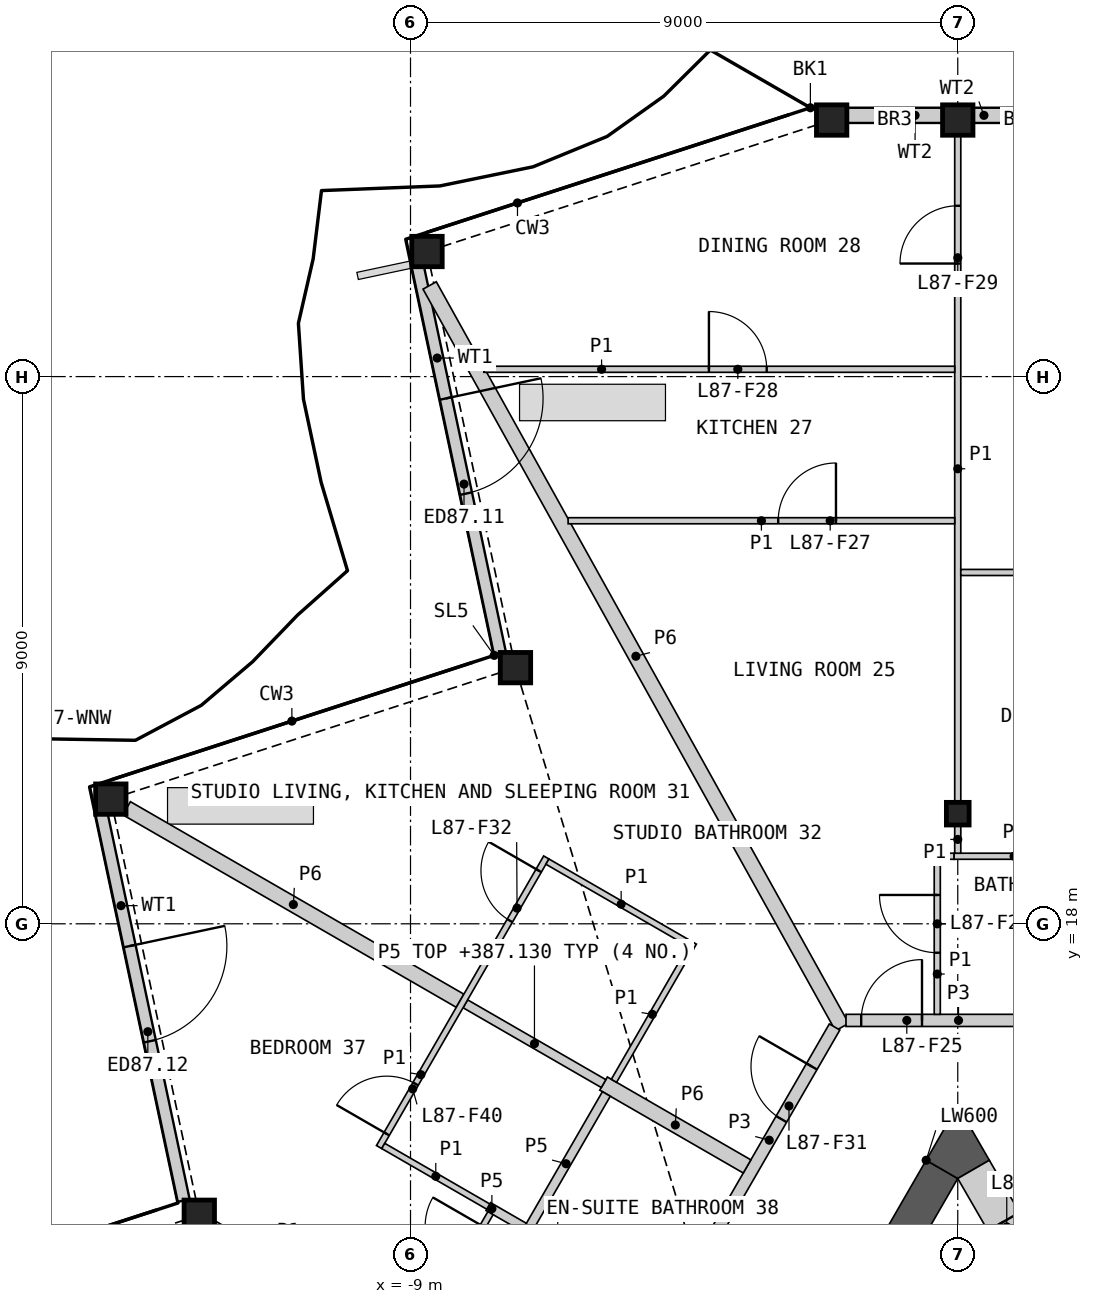
"""IFC4 building model, lengths in metres.
Left out: names, types, materials, properties, quantities, classifications, styles, units other than length and angle.
Written with IfcOpenShell. Run it as: python <this file> out.ifc"""

import sys

from ifc_helpers import new_model, si_unit, direction, frame, frame_2d, origin, origin_2d, place, context, subcontext, project, spatial, polyline, rectangle, hollow_rectangle, i_section, outline, extrude, element, fill, save


model = new_model("IFC4")
c1 = context("Model", 3, precision=1e-05, world=origin(), true_north=direction((0.0, 1.0)))
c2 = subcontext(c1, "Body", "Model", "MODEL_VIEW")
j1 = project(units=[si_unit("LENGTHUNIT", "METRE"), si_unit("PLANEANGLEUNIT", "RADIAN")], contexts=[c1])
p1 = place(None, origin())
s1 = spatial("IfcSite", under=j1, at=p1, CompositionType="ELEMENT")
p2 = place(p1, origin())
s2 = spatial("IfcBuilding", under=s1, at=p2, CompositionType="ELEMENT")
p3 = place(p2, frame((0.0, 0.0, 384.8)))
s3 = spatial("IfcBuildingStorey", under=s2, at=p3, CompositionType="ELEMENT", Elevation=384.8)
for number, where, z_axis, x_axis in (
    (1, (0.0, 31.219, 0.0), (0.0, 0.0, 1.0), (1.0, 0.0, 0.0)),
    (2, (-2.074, 31.219, 0.0), (0.0, 0.0, 1.0), (1.0, 0.0, 0.0)),
    (3, (-8.729, 29.057, 0.0), (0.0, 0.0, 1.0), (1.0, 0.0, 0.0)),
    (4, (-7.274, 22.213, 0.0), (0.0, 0.0, 1.0), (1.0, 0.0, 0.0)),
    (5, (-13.929, 20.051, 0.0), (0.0, 0.0, 1.0), (1.0, 0.0, 0.0)),
    (6, (-12.474, 13.206, 0.0), (0.0, 0.0, 1.0), (1.0, 0.0, 0.0)),
):
    element("IfcColumn", number, at=place(p3, frame(where, z_axis=z_axis, x_axis=x_axis)), inside=s3, PredefinedType="COLUMN", context=c2, shape_type="SweptSolid", body=[
        extrude(hollow_rectangle(XDim=0.5, YDim=0.5, WallThickness=0.03, at=origin_2d()), origin(), (0.0, 0.0, 1.0), 3.4),
    ])
p4 = place(p3, frame((0.0, 19.811, 0.0), z_axis=(0.0, 0.0, 1.0), x_axis=(1.0, 0.0, 0.0)))
e7 = element("IfcColumn", 7, at=p4, inside=s3, PredefinedType="COLUMN", context=c2, shape_type="SweptSolid", body=[
    extrude(i_section(OverallWidth=0.374, OverallDepth=0.372, WebThickness=0.016, FlangeThickness=0.026, at=origin_2d()), origin(), (0.0, 0.0, 1.0), 3.4),
])
p5 = place(p3, frame((2.058, 31.296, 0.0), z_axis=(0.0, 0.0, 1.0), x_axis=(-1.0, 0.0, 0.0)))
e8 = element("IfcWall", 8, at=p5, inside=s3, PredefinedType="SOLIDWALL", context=c2, shape_type="SweptSolid", body=[
    extrude(rectangle(XDim=1.808, YDim=0.25, at=frame_2d((0.904, 0.0))), origin(), (0.0, 0.0, 1.0), 2.634),
])
p6 = place(p5, frame((0.35, 0.0, 1.8)))
e9 = element("IfcOpeningElement", 9, at=p6, cuts=e8, PredefinedType="OPENING", context=c2, shape_type="SweptSolid", body=[
    extrude(rectangle(XDim=0.9, YDim=0.6, at=frame_2d((0.45, 0.3))), frame((0.0, 0.135, 0.0), z_axis=(0.0, -1.0, 0.0), x_axis=(1.0, 0.0, 0.0)), (0.0, 0.0, 1.0), 0.27),
])
p7 = place(p3, frame((-0.25, 31.296, 0.0), z_axis=(0.0, 0.0, 1.0), x_axis=(-1.0, 0.0, 0.0)))
e10 = element("IfcWall", 10, at=p7, inside=s3, PredefinedType="SOLIDWALL", context=c2, shape_type="SweptSolid", body=[
    extrude(rectangle(XDim=1.808, YDim=0.25, at=frame_2d((0.904, 0.0))), origin(), (0.0, 0.0, 1.0), 2.634),
])
p8 = place(p3, frame((-8.905, 28.922, 0.0), z_axis=(0.0, 0.0, 1.0), x_axis=(0.207917488951, -0.978146368285, 0.0)))
e11 = element("IfcWall", 11, at=p8, inside=s3, PredefinedType="SOLIDWALL", context=c2, shape_type="SweptSolid", body=[
    extrude(rectangle(XDim=6.612, YDim=0.2, at=frame_2d((3.306, 0.0))), origin(), (0.0, 0.0, 1.0), 2.634),
])
p9 = place(p8, frame((2.333, 0.0, 0.0)))
e12 = element("IfcOpeningElement", 12, at=p9, cuts=e11, PredefinedType="OPENING", context=c2, shape_type="SweptSolid", body=[
    extrude(rectangle(XDim=1.6, YDim=2.25, at=frame_2d((0.8, 1.125))), frame((0.0, 0.11, 0.0), z_axis=(0.0, -1.0, 0.0), x_axis=(1.0, 0.0, 0.0)), (0.0, 0.0, 1.0), 0.22),
])
p10 = place(p3, frame((-14.104, 19.915, 0.0), z_axis=(0.0, 0.0, 1.0), x_axis=(0.207924998532, -0.978144771997, 0.0)))
e13 = element("IfcWall", 13, at=p10, inside=s3, PredefinedType="SOLIDWALL", context=c2, shape_type="SweptSolid", body=[
    extrude(rectangle(XDim=6.612, YDim=0.2, at=frame_2d((3.306, 0.0))), origin(), (0.0, 0.0, 1.0), 2.634),
])
p11 = place(p10, frame((2.333, 0.0, 0.0)))
e14 = element("IfcOpeningElement", 14, at=p11, cuts=e13, PredefinedType="OPENING", context=c2, shape_type="SweptSolid", body=[
    extrude(rectangle(XDim=1.6, YDim=2.25, at=frame_2d((0.8, 1.125))), frame((0.0, 0.11, 0.0), z_axis=(0.0, -1.0, 0.0), x_axis=(1.0, 0.0, 0.0)), (0.0, 0.0, 1.0), 0.22),
])
p12 = place(p3, frame((-0.26, 13.961, 0.0), z_axis=(0.0, 0.0, 1.0), x_axis=(-0.499980485389, -0.866036670257, 0.0)))
e15 = element("IfcWall", 15, at=p12, inside=s3, PredefinedType="SHEAR", context=c2, shape_type="SweptSolid", body=[
    extrude(rectangle(XDim=4.559, YDim=0.6, at=frame_2d((2.28, 0.0))), origin(), (0.0, 0.0, 1.0), 3.1),
])
p13 = place(p3, origin())
e16 = element("IfcWall", 16, at=p13, inside=s3, PredefinedType="SHEAR", context=c2, shape_type="SweptSolid", body=[
    extrude(outline(polyline([(-0.52, 14.111), (0.0, 15.011), (0.52, 14.111), (0.0, 13.811), (-0.52, 14.111)])), origin(), (0.0, 0.0, 1.0), 3.1),
])
p14 = place(p3, frame((1.556, 11.716, 0.0), z_axis=(0.0, 0.0, 1.0), x_axis=(-0.500018667571, 0.866014625789, 0.0)))
e17 = element("IfcWall", 17, at=p14, inside=s3, PredefinedType="SHEAR", context=c2, shape_type="SweptSolid", body=[
    extrude(rectangle(XDim=2.592, YDim=0.6, at=frame_2d((1.296, 0.0))), origin(), (0.0, 0.0, 1.0), 3.1),
])
p15 = place(p14, frame((0.6, 0.0, 0.0)))
e18 = element("IfcOpeningElement", 18, at=p15, cuts=e17, PredefinedType="OPENING", context=c2, shape_type="SweptSolid", body=[
    extrude(rectangle(XDim=1.0, YDim=2.1, at=frame_2d((0.5, 1.05))), frame((0.0, 0.31, 0.0), z_axis=(0.0, -1.0, 0.0), x_axis=(1.0, 0.0, 0.0)), (0.0, 0.0, 1.0), 0.62),
])
p16 = place(p3, frame((-8.685, 28.499, 0.0), z_axis=(0.0, 0.0, 1.0), x_axis=(0.486017177904, -0.873949256412, 0.0)))
e19 = element("IfcWall", 19, at=p16, inside=s3, PredefinedType="PARTITIONING", context=c2, shape_type="SweptSolid", body=[
    extrude(rectangle(XDim=13.956, YDim=0.25, at=frame_2d((6.978, 0.0))), origin(), (0.0, 0.0, 1.0), 2.33),
])
p17 = place(p3, frame((-13.669, 19.9, 0.0), z_axis=(0.0, 0.0, 1.0), x_axis=(0.866032778651, -0.499987226139, 0.0)))
e20 = element("IfcWall", 20, at=p17, inside=s3, PredefinedType="PARTITIONING", context=c2, shape_type="SweptSolid", body=[
    extrude(rectangle(XDim=6.332, YDim=0.25, at=frame_2d((3.166, 0.0))), origin(), (0.0, 0.0, 1.0), 2.33),
])
p18 = place(p3, frame((-4.176, 12.579, 0.0), z_axis=(0.0, 0.0, 1.0), x_axis=(0.500004215162, 0.866022970146, 0.0)))
e21 = element("IfcWall", 21, at=p18, inside=s3, PredefinedType="PARTITIONING", context=c2, shape_type="SweptSolid", body=[
    extrude(rectangle(XDim=4.3, YDim=0.2, at=frame_2d((2.15, 0.0))), origin(), (0.0, 0.0, 1.0), 3.1),
])
p19 = place(p18, frame((2.55, 0.0, 0.0)))
e22 = element("IfcOpeningElement", 22, at=p19, cuts=e21, PredefinedType="OPENING", context=c2, shape_type="SweptSolid", body=[
    extrude(rectangle(XDim=1.0, YDim=2.1, at=frame_2d((0.5, 1.05))), frame((0.0, 0.11, 0.0), z_axis=(0.0, -1.0, 0.0), x_axis=(1.0, 0.0, 0.0)), (0.0, 0.0, 1.0), 0.22),
])
p20 = place(p3, frame((-1.838, 16.411, 0.0), z_axis=(0.0, 0.0, 1.0), x_axis=(1.0, 0.0, 0.0)))
e23 = element("IfcWall", 23, at=p20, inside=s3, PredefinedType="PARTITIONING", context=c2, shape_type="SweptSolid", body=[
    extrude(rectangle(XDim=3.701, YDim=0.2, at=frame_2d((1.851, 0.0))), origin(), (0.0, 0.0, 1.0), 3.1),
])
p21 = place(p20, frame((0.25, 0.0, 0.0)))
e24 = element("IfcOpeningElement", 24, at=p21, cuts=e23, PredefinedType="OPENING", context=c2, shape_type="SweptSolid", body=[
    extrude(rectangle(XDim=1.0, YDim=2.1, at=frame_2d((0.5, 1.05))), frame((0.0, 0.11, 0.0), z_axis=(0.0, -1.0, 0.0), x_axis=(1.0, 0.0, 0.0)), (0.0, 0.0, 1.0), 0.22),
])
p22 = place(p3, frame((-5.825, 15.372, 0.0), z_axis=(0.0, 0.0, 1.0), x_axis=(0.866051307416, -0.49995513091, 0.0)))
e25 = element("IfcWall", 25, at=p22, inside=s3, PredefinedType="PARTITIONING", context=c2, shape_type="SweptSolid", body=[
    extrude(rectangle(XDim=2.725, YDim=0.25, at=frame_2d((1.362, 0.0))), origin(), (0.0, 0.0, 1.0), 2.33),
])
p23 = place(p3, frame((-8.098, 16.684, 0.0), z_axis=(0.0, 0.0, 1.0), x_axis=(0.866036909293, -0.499980071345, 0.0)))
e26 = element("IfcWall", 26, at=p23, inside=s3, PredefinedType="PLUMBINGWALL", context=c2, shape_type="SweptSolid", body=[
    extrude(rectangle(XDim=2.625, YDim=0.15, at=frame_2d((1.312, 0.0))), origin(), (0.0, 0.0, 1.0), 2.33),
])
p24 = place(p3, frame((-7.104, 12.906, 0.0), z_axis=(0.0, 0.0, 1.0), x_axis=(0.499993606316, 0.866029095148, 0.0)))
e27 = element("IfcWall", 27, at=p24, inside=s3, PredefinedType="PLUMBINGWALL", context=c2, shape_type="SweptSolid", body=[
    extrude(rectangle(XDim=2.65, YDim=0.15, at=frame_2d((1.325, 0.0))), origin(), (0.0, 0.0, 1.0), 2.33),
])
p25 = place(p3, frame((-7.72, 13.349, 0.0), z_axis=(0.0, 0.0, 1.0), x_axis=(0.866113839764, -0.499846793097, 0.0)))
e28 = element("IfcWall", 28, at=p25, inside=s3, PredefinedType="PLUMBINGWALL", context=c2, shape_type="SweptSolid", body=[
    extrude(rectangle(XDim=0.68, YDim=0.15, at=frame_2d((0.34, 0.0))), origin(), (0.0, 0.0, 1.0), 2.33),
])
p26 = place(p3, frame((0.0, 20.008, 0.0), z_axis=(0.0, 0.0, 1.0), x_axis=(0.0, 1.0, 0.0)))
e29 = element("IfcWall", 29, at=p26, inside=s3, PredefinedType="PARTITIONING", context=c2, shape_type="SweptSolid", body=[
    extrude(rectangle(XDim=10.951, YDim=0.1, at=frame_2d((5.476, 0.0))), origin(), (0.0, 0.0, 1.0), 2.33),
])
p27 = place(p26, frame((8.851, 0.0, 0.0)))
e30 = element("IfcOpeningElement", 30, at=p27, cuts=e29, PredefinedType="OPENING", context=c2, shape_type="SweptSolid", body=[
    extrude(rectangle(XDim=0.95, YDim=2.1, at=frame_2d((0.475, 1.05))), frame((0.0, 0.06, 0.0), z_axis=(0.0, -1.0, 0.0), x_axis=(1.0, 0.0, 0.0)), (0.0, 0.0, 1.0), 0.12),
])
p28 = place(p3, frame((-7.793, 27.12, 0.0), z_axis=(0.0, 0.0, 1.0), x_axis=(1.0, 0.0, 0.0)))
e31 = element("IfcWall", 31, at=p28, inside=s3, PredefinedType="PARTITIONING", context=c2, shape_type="SweptSolid", body=[
    extrude(rectangle(XDim=7.743, YDim=0.1, at=frame_2d((3.872, 0.0))), origin(), (0.0, 0.0, 1.0), 2.33),
])
p29 = place(p28, frame((3.701, 0.0, 0.0)))
e32 = element("IfcOpeningElement", 32, at=p29, cuts=e31, PredefinedType="OPENING", context=c2, shape_type="SweptSolid", body=[
    extrude(rectangle(XDim=0.95, YDim=2.1, at=frame_2d((0.475, 1.05))), frame((0.0, 0.06, 0.0), z_axis=(0.0, -1.0, 0.0), x_axis=(1.0, 0.0, 0.0)), (0.0, 0.0, 1.0), 0.12),
])
p30 = place(p3, frame((-6.408, 24.629, 0.0), z_axis=(0.0, 0.0, 1.0), x_axis=(1.0, 0.0, 0.0)))
e33 = element("IfcWall", 33, at=p30, inside=s3, PredefinedType="PARTITIONING", context=c2, shape_type="SweptSolid", body=[
    extrude(rectangle(XDim=6.358, YDim=0.1, at=frame_2d((3.179, 0.0))), origin(), (0.0, 0.0, 1.0), 2.33),
])
p31 = place(p30, frame((3.455, 0.0, 0.0)))
e34 = element("IfcOpeningElement", 34, at=p31, cuts=e33, PredefinedType="OPENING", context=c2, shape_type="SweptSolid", body=[
    extrude(rectangle(XDim=0.95, YDim=2.1, at=frame_2d((0.475, 1.05))), frame((0.0, 0.06, 0.0), z_axis=(0.0, -1.0, 0.0), x_axis=(1.0, 0.0, 0.0)), (0.0, 0.0, 1.0), 0.12),
])
p32 = place(p3, frame((0.05, 23.778, 0.0), z_axis=(0.0, 0.0, 1.0), x_axis=(1.0, 0.0, 0.0)))
e35 = element("IfcWall", 35, at=p32, inside=s3, PredefinedType="PARTITIONING", context=c2, shape_type="SweptSolid", body=[
    extrude(rectangle(XDim=5.91, YDim=0.1, at=frame_2d((2.955, 0.0))), origin(), (0.0, 0.0, 1.0), 2.33),
])
p33 = place(p32, frame((3.291, 0.0, 0.0)))
e36 = element("IfcOpeningElement", 36, at=p33, cuts=e35, PredefinedType="OPENING", context=c2, shape_type="SweptSolid", body=[
    extrude(rectangle(XDim=0.95, YDim=2.1, at=frame_2d((0.475, 1.05))), frame((0.0, 0.06, 0.0), z_axis=(0.0, -1.0, 0.0), x_axis=(1.0, 0.0, 0.0)), (0.0, 0.0, 1.0), 0.12),
])
p34 = place(p3, frame((-9.517, 14.328, 0.0), z_axis=(0.0, 0.0, 1.0), x_axis=(0.499996545922, 0.866027397988, 0.0)))
e37 = element("IfcWall", 37, at=p34, inside=s3, PredefinedType="PARTITIONING", context=c2, shape_type="SweptSolid", body=[
    extrude(rectangle(XDim=5.5, YDim=0.1, at=frame_2d((2.75, 0.0))), origin(), (0.0, 0.0, 1.0), 2.33),
])
p35 = place(p34, frame((4.3, 0.0, 0.0)))
e38 = element("IfcOpeningElement", 38, at=p35, cuts=e37, PredefinedType="OPENING", context=c2, shape_type="SweptSolid", body=[
    extrude(rectangle(XDim=0.95, YDim=2.1, at=frame_2d((0.475, 1.05))), frame((0.0, 0.06, 0.0), z_axis=(0.0, -1.0, 0.0), x_axis=(1.0, 0.0, 0.0)), (0.0, 0.0, 1.0), 0.12),
])
p36 = place(p34, frame((0.25, 0.0, 0.0)))
e39 = element("IfcOpeningElement", 39, at=p36, cuts=e37, PredefinedType="OPENING", context=c2, shape_type="SweptSolid", body=[
    extrude(rectangle(XDim=0.95, YDim=2.1, at=frame_2d((0.475, 1.05))), frame((0.0, 0.06, 0.0), z_axis=(0.0, -1.0, 0.0), x_axis=(1.0, 0.0, 0.0)), (0.0, 0.0, 1.0), 0.12),
])
p37 = place(p3, frame((-12.214, 13.056, 0.0), z_axis=(0.0, 0.0, 1.0), x_axis=(0.866017452598, -0.500013771606, 0.0)))
e40 = element("IfcWall", 40, at=p37, inside=s3, PredefinedType="PARTITIONING", context=c2, shape_type="SweptSolid", body=[
    extrude(rectangle(XDim=4.425, YDim=0.1, at=frame_2d((2.213, 0.0))), origin(), (0.0, 0.0, 1.0), 2.33),
])
p38 = place(p37, frame((1.994, 0.0, 0.0)))
e41 = element("IfcOpeningElement", 41, at=p38, cuts=e40, PredefinedType="OPENING", context=c2, shape_type="SweptSolid", body=[
    extrude(rectangle(XDim=0.95, YDim=2.1, at=frame_2d((0.475, 1.05))), frame((0.0, 0.06, 0.0), z_axis=(0.0, -1.0, 0.0), x_axis=(1.0, 0.0, 0.0)), (0.0, 0.0, 1.0), 0.12),
])
p39 = place(p3, frame((-6.748, 19.023, 0.0), z_axis=(0.0, 0.0, 1.0), x_axis=(0.866034573852, -0.49998411664, 0.0)))
e42 = element("IfcWall", 42, at=p39, inside=s3, PredefinedType="PARTITIONING", context=c2, shape_type="SweptSolid", body=[
    extrude(rectangle(XDim=2.8, YDim=0.1, at=frame_2d((1.4, 0.0))), origin(), (0.0, 0.0, 1.0), 2.33),
])
p40 = place(p3, frame((-5.654, 15.418, 0.0), z_axis=(0.0, 0.0, 1.0), x_axis=(0.500048846702, 0.865997200291, 0.0)))
e43 = element("IfcWall", 43, at=p40, inside=s3, PredefinedType="PARTITIONING", context=c2, shape_type="SweptSolid", body=[
    extrude(rectangle(XDim=2.525, YDim=0.1, at=frame_2d((1.263, 0.0))), origin(), (0.0, 0.0, 1.0), 2.33),
])
p41 = place(p3, frame((-0.337, 16.511, 0.0), z_axis=(0.0, 0.0, 1.0), x_axis=(0.0, 1.0, 0.0)))
e44 = element("IfcWall", 44, at=p41, inside=s3, PredefinedType="PARTITIONING", context=c2, shape_type="SweptSolid", body=[
    extrude(rectangle(XDim=2.649, YDim=0.1, at=frame_2d((1.325, 0.0))), origin(), (0.0, 0.0, 1.0), 2.33),
])
p42 = place(p41, frame((1.013, 0.0, 0.0)))
e45 = element("IfcOpeningElement", 45, at=p42, cuts=e44, PredefinedType="OPENING", context=c2, shape_type="SweptSolid", body=[
    extrude(rectangle(XDim=0.95, YDim=2.1, at=frame_2d((0.475, 1.05))), frame((0.0, 0.06, 0.0), z_axis=(0.0, -1.0, 0.0), x_axis=(1.0, 0.0, 0.0)), (0.0, 0.0, 1.0), 0.12),
])
p43 = place(p3, frame((-8.872, 11.184, 0.0), z_axis=(0.0, 0.0, 1.0), x_axis=(0.499986429846, 0.866033238375, 0.0)))
e46 = element("IfcWall", 46, at=p43, inside=s3, PredefinedType="PARTITIONING", context=c2, shape_type="SweptSolid", body=[
    extrude(rectangle(XDim=2.375, YDim=0.1, at=frame_2d((1.188, 0.0))), origin(), (0.0, 0.0, 1.0), 2.33),
])
p44 = place(p43, frame((1.175, 0.0, 0.0)))
e47 = element("IfcOpeningElement", 47, at=p44, cuts=e46, PredefinedType="OPENING", context=c2, shape_type="SweptSolid", body=[
    extrude(rectangle(XDim=0.95, YDim=2.1, at=frame_2d((0.475, 1.05))), frame((0.0, 0.06, 0.0), z_axis=(0.0, -1.0, 0.0), x_axis=(1.0, 0.0, 0.0)), (0.0, 0.0, 1.0), 0.12),
])
p45 = place(p3, frame((-9.448, 14.346, 0.0), z_axis=(0.0, 0.0, 1.0), x_axis=(0.866020521143, -0.500008456887, 0.0)))
e48 = element("IfcWall", 48, at=p45, inside=s3, PredefinedType="PARTITIONING", context=c2, shape_type="SweptSolid", body=[
    extrude(rectangle(XDim=1.995, YDim=0.1, at=frame_2d((0.998, 0.0))), origin(), (0.0, 0.0, 1.0), 2.33),
])
p46 = place(p3, frame((-0.06, 19.111, 0.0), z_axis=(0.0, 0.0, 1.0), x_axis=(1.0, 0.0, 0.0)))
e49 = element("IfcWall", 49, at=p46, inside=s3, PredefinedType="PARTITIONING", context=c2, shape_type="SweptSolid", body=[
    extrude(rectangle(XDim=1.973, YDim=0.1, at=frame_2d((0.987, 0.0))), origin(), (0.0, 0.0, 1.0), 2.33),
])
p47 = place(p3, frame((0.0, 19.161, 0.0), z_axis=(0.0, 0.0, 1.0), x_axis=(0.0, 1.0, 0.0)))
e50 = element("IfcWall", 50, at=p47, inside=s3, PredefinedType="PARTITIONING", context=c2, shape_type="SweptSolid", body=[
    extrude(rectangle(XDim=0.453, YDim=0.1, at=frame_2d((0.227, 0.0))), origin(), (0.0, 0.0, 1.0), 2.33),
])
p48 = place(p3, frame((-0.287, 19.11, 0.0), z_axis=(0.0, 0.0, 1.0), x_axis=(0.999994683407, 0.003260852229, 0.0)))
e51 = element("IfcWall", 51, at=p48, inside=s3, PredefinedType="PARTITIONING", context=c2, shape_type="SweptSolid", body=[
    extrude(rectangle(XDim=0.225, YDim=0.1, at=frame_2d((0.112, 0.0))), origin(), (0.0, 0.0, 1.0), 2.33),
])
p49 = place(p6, origin())
e52 = element("IfcWindow", 52, at=p49, inside=s3, PartitioningType="SINGLE_PANEL", PredefinedType="WINDOW", context=c2, shape_type="SweptSolid", body=[
    extrude(rectangle(XDim=0.9, YDim=0.6, at=frame_2d((0.45, 0.3))), frame((0.0, 0.03, 0.0), z_axis=(0.0, -1.0, 0.0), x_axis=(1.0, 0.0, 0.0)), (0.0, 0.0, 1.0), 0.06),
])
fill(e9, e52)
p50 = place(p9, origin())
e53 = element("IfcDoor", 53, at=p50, inside=s3, OperationType="DOUBLE_DOOR_SINGLE_SWING", PredefinedType="DOOR", context=c2, shape_type="SweptSolid", body=[
    extrude(rectangle(XDim=1.6, YDim=2.25, at=frame_2d((0.8, 1.125))), frame((0.0, 0.025, 0.0), z_axis=(0.0, -1.0, 0.0), x_axis=(1.0, 0.0, 0.0)), (0.0, 0.0, 1.0), 0.05),
])
fill(e12, e53)
p51 = place(p11, origin())
e54 = element("IfcDoor", 54, at=p51, inside=s3, OperationType="DOUBLE_DOOR_SINGLE_SWING", PredefinedType="DOOR", context=c2, shape_type="SweptSolid", body=[
    extrude(rectangle(XDim=1.6, YDim=2.25, at=frame_2d((0.8, 1.125))), frame((0.0, 0.025, 0.0), z_axis=(0.0, -1.0, 0.0), x_axis=(1.0, 0.0, 0.0)), (0.0, 0.0, 1.0), 0.05),
])
fill(e14, e54)
p52 = place(p15, origin())
e55 = element("IfcDoor", 55, at=p52, inside=s3, OperationType="SINGLE_SWING_RIGHT", PredefinedType="DOOR", context=c2, shape_type="SweptSolid", body=[
    extrude(rectangle(XDim=1.0, YDim=2.1, at=frame_2d((0.5, 1.05))), frame((0.0, 0.055, 0.0), z_axis=(0.0, -1.0, 0.0), x_axis=(1.0, 0.0, 0.0)), (0.0, 0.0, 1.0), 0.05),
])
fill(e18, e55)
p53 = place(p21, origin())
e56 = element("IfcDoor", 56, at=p53, inside=s3, OperationType="SINGLE_SWING_RIGHT", PredefinedType="DOOR", context=c2, shape_type="SweptSolid", body=[
    extrude(rectangle(XDim=1.0, YDim=2.1, at=frame_2d((0.5, 1.05))), frame((0.0, 0.025, 0.0), z_axis=(0.0, -1.0, 0.0), x_axis=(1.0, 0.0, 0.0)), (0.0, 0.0, 1.0), 0.05),
])
fill(e24, e56)
p54 = place(p42, origin())
e57 = element("IfcDoor", 57, at=p54, inside=s3, OperationType="SINGLE_SWING_RIGHT", PredefinedType="DOOR", context=c2, shape_type="SweptSolid", body=[
    extrude(rectangle(XDim=0.95, YDim=2.1, at=frame_2d((0.475, 1.05))), frame((0.0, 0.025, 0.0), z_axis=(0.0, -1.0, 0.0), x_axis=(1.0, 0.0, 0.0)), (0.0, 0.0, 1.0), 0.05),
])
fill(e45, e57)
p55 = place(p31, origin())
e58 = element("IfcDoor", 58, at=p55, inside=s3, OperationType="SINGLE_SWING_RIGHT", PredefinedType="DOOR", context=c2, shape_type="SweptSolid", body=[
    extrude(rectangle(XDim=0.95, YDim=2.1, at=frame_2d((0.475, 1.05))), frame((0.0, 0.025, 0.0), z_axis=(0.0, -1.0, 0.0), x_axis=(1.0, 0.0, 0.0)), (0.0, 0.0, 1.0), 0.05),
])
fill(e34, e58)
p56 = place(p29, origin())
e59 = element("IfcDoor", 59, at=p56, inside=s3, OperationType="SINGLE_SWING_LEFT", PredefinedType="DOOR", context=c2, shape_type="SweptSolid", body=[
    extrude(rectangle(XDim=0.95, YDim=2.1, at=frame_2d((0.475, 1.05))), frame((0.0, 0.025, 0.0), z_axis=(0.0, -1.0, 0.0), x_axis=(1.0, 0.0, 0.0)), (0.0, 0.0, 1.0), 0.05),
])
fill(e32, e59)
p57 = place(p27, origin())
e60 = element("IfcDoor", 60, at=p57, inside=s3, OperationType="SINGLE_SWING_LEFT", PredefinedType="DOOR", context=c2, shape_type="SweptSolid", body=[
    extrude(rectangle(XDim=0.95, YDim=2.1, at=frame_2d((0.475, 1.05))), frame((0.0, 0.025, 0.0), z_axis=(0.0, -1.0, 0.0), x_axis=(1.0, 0.0, 0.0)), (0.0, 0.0, 1.0), 0.05),
])
fill(e30, e60)
p58 = place(p19, origin())
e61 = element("IfcDoor", 61, at=p58, inside=s3, OperationType="SINGLE_SWING_RIGHT", PredefinedType="DOOR", context=c2, shape_type="SweptSolid", body=[
    extrude(rectangle(XDim=1.0, YDim=2.1, at=frame_2d((0.5, 1.05))), frame((0.0, 0.025, 0.0), z_axis=(0.0, -1.0, 0.0), x_axis=(1.0, 0.0, 0.0)), (0.0, 0.0, 1.0), 0.05),
])
fill(e22, e61)
p59 = place(p35, origin())
e62 = element("IfcDoor", 62, at=p59, inside=s3, OperationType="SINGLE_SWING_RIGHT", PredefinedType="DOOR", context=c2, shape_type="SweptSolid", body=[
    extrude(rectangle(XDim=0.95, YDim=2.1, at=frame_2d((0.475, 1.05))), frame((0.0, 0.025, 0.0), z_axis=(0.0, -1.0, 0.0), x_axis=(1.0, 0.0, 0.0)), (0.0, 0.0, 1.0), 0.05),
])
fill(e38, e62)
p60 = place(p36, origin())
e63 = element("IfcDoor", 63, at=p60, inside=s3, OperationType="SINGLE_SWING_LEFT", PredefinedType="DOOR", context=c2, shape_type="SweptSolid", body=[
    extrude(rectangle(XDim=0.95, YDim=2.1, at=frame_2d((0.475, 1.05))), frame((0.0, 0.025, 0.0), z_axis=(0.0, -1.0, 0.0), x_axis=(1.0, 0.0, 0.0)), (0.0, 0.0, 1.0), 0.05),
])
fill(e39, e63)
save(model, sys.argv[1])
